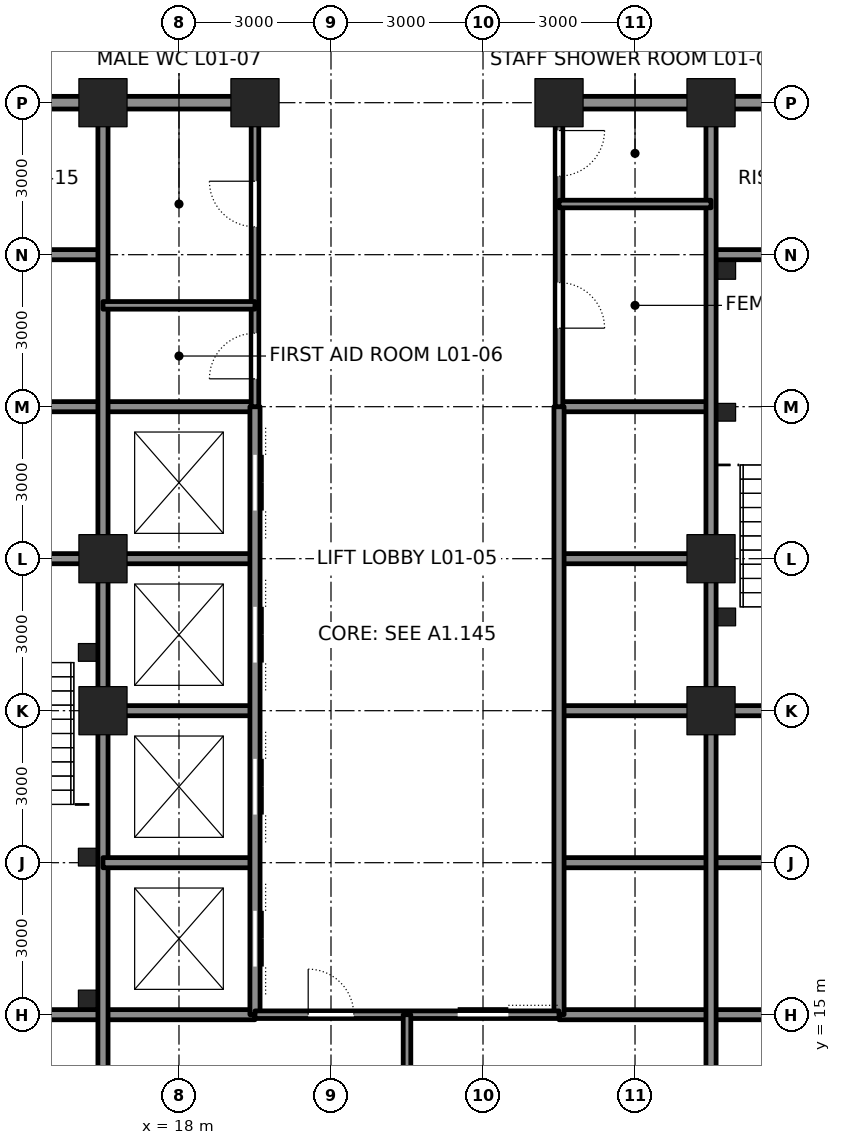
"""IFC4 building model, lengths in metres.
Left out: names, types, materials, properties, quantities, classifications, styles, units other than length and angle.
Written with IfcOpenShell. Run it as: python <this file> out.ifc"""

import sys

from ifc_helpers import new_model, si_unit, direction, frame, frame_2d, origin, origin_2d, place, context, subcontext, project, spatial, rectangle, hollow_rectangle, extrude, element, fill, save


model = new_model("IFC4")
c1 = context("Model", 3, precision=1e-05, world=origin(), true_north=direction((0.0, 1.0)))
c2 = subcontext(c1, "Body", "Model", "MODEL_VIEW")
j1 = project(units=[si_unit("LENGTHUNIT", "METRE"), si_unit("PLANEANGLEUNIT", "RADIAN")], contexts=[c1])
p1 = place(None, origin())
s1 = spatial("IfcSite", under=j1, at=p1, CompositionType="ELEMENT")
p2 = place(p1, origin())
s2 = spatial("IfcBuilding", under=s1, at=p2, CompositionType="ELEMENT")
p3 = place(p2, frame((0.0, 0.0, 6.0)))
s3 = spatial("IfcBuildingStorey", under=s2, at=p3, CompositionType="ELEMENT", Elevation=6.0)
for number, where, z_axis, x_axis in (
    (1, (16.5, 33.0, 0.0), (0.0, 0.0, 1.0), (1.0, 0.0, 0.0)),
    (2, (19.5, 33.0, 0.0), (0.0, 0.0, 1.0), (1.0, 0.0, 0.0)),
    (3, (25.5, 33.0, 0.0), (0.0, 0.0, 1.0), (1.0, 0.0, 0.0)),
    (4, (28.5, 33.0, 0.0), (0.0, 0.0, 1.0), (1.0, 0.0, 0.0)),
    (5, (16.5, 21.0, 0.0), (0.0, 0.0, 1.0), (1.0, 0.0, 0.0)),
    (6, (16.5, 24.0, 0.0), (0.0, 0.0, 1.0), (1.0, 0.0, 0.0)),
    (7, (28.5, 21.0, 0.0), (0.0, 0.0, 1.0), (1.0, 0.0, 0.0)),
    (8, (28.5, 24.0, 0.0), (0.0, 0.0, 1.0), (1.0, 0.0, 0.0)),
):
    element("IfcColumn", number, at=place(p3, frame(where, z_axis=z_axis, x_axis=x_axis)), inside=s3, PredefinedType="COLUMN", context=c2, shape_type="SweptSolid", body=[
        extrude(hollow_rectangle(XDim=0.95, YDim=0.95, WallThickness=0.095, at=origin_2d()), origin(), (0.0, 0.0, 1.0), 7.5),
    ])
for number, where, z_axis, x_axis in (
    (9, (12.0, 15.0, 0.0), (0.0, 0.0, 1.0), (1.0, 0.0, 0.0)),
    (10, (25.5, 15.0, 0.0), (0.0, 0.0, 1.0), (1.0, 0.0, 0.0)),
):
    element("IfcWall", number, at=place(p3, frame(where, z_axis=z_axis, x_axis=x_axis)), inside=s3, PredefinedType="SOLIDWALL", context=c2, shape_type="SweptSolid", body=[
        extrude(rectangle(XDim=7.5, YDim=0.2, at=frame_2d((3.75, 0.0))), origin(), (0.0, 0.0, 1.0), 7.3),
    ])
p4 = place(p3, frame((12.25, 24.0, 0.0), z_axis=(0.0, 0.0, 1.0), x_axis=(1.0, 0.0, 0.0)))
e11 = element("IfcWall", 11, at=p4, inside=s3, PredefinedType="SOLIDWALL", context=c2, shape_type="SweptSolid", body=[
    extrude(rectangle(XDim=4.0, YDim=0.2, at=frame_2d((2.0, 0.0))), origin(), (0.0, 0.0, 1.0), 6.35),
])
p5 = place(p4, frame((1.4, 0.0, 0.0)))
e12 = element("IfcOpeningElement", 12, at=p5, cuts=e11, PredefinedType="OPENING", context=c2, shape_type="SweptSolid", body=[
    extrude(rectangle(XDim=1.2, YDim=2.1, at=frame_2d((0.6, 1.05))), frame((0.0, 0.11, 0.0), z_axis=(0.0, -1.0, 0.0), x_axis=(1.0, 0.0, 0.0)), (0.0, 0.0, 1.0), 0.22),
])
for number, where, z_axis, x_axis in (
    (13, (16.75, 24.0, 0.0), (0.0, 0.0, 1.0), (1.0, 0.0, 0.0)),
    (14, (25.5, 24.0, 0.0), (0.0, 0.0, 1.0), (1.0, 0.0, 0.0)),
):
    element("IfcWall", number, at=place(p3, frame(where, z_axis=z_axis, x_axis=x_axis)), inside=s3, PredefinedType="SOLIDWALL", context=c2, shape_type="SweptSolid", body=[
        extrude(rectangle(XDim=2.75, YDim=0.2, at=frame_2d((1.375, 0.0))), origin(), (0.0, 0.0, 1.0), 6.35),
    ])
p6 = place(p3, frame((12.0, 27.0, 0.0), z_axis=(0.0, 0.0, 1.0), x_axis=(1.0, 0.0, 0.0)))
e15 = element("IfcWall", 15, at=p6, inside=s3, PredefinedType="SOLIDWALL", context=c2, shape_type="SweptSolid", body=[
    extrude(rectangle(XDim=7.5, YDim=0.2, at=frame_2d((3.75, 0.0))), origin(), (0.0, 0.0, 1.0), 7.3),
])
p7 = place(p6, frame((1.65, 0.0, 0.0)))
e16 = element("IfcOpeningElement", 16, at=p7, cuts=e15, PredefinedType="OPENING", context=c2, shape_type="SweptSolid", body=[
    extrude(rectangle(XDim=1.2, YDim=2.1, at=frame_2d((0.6, 1.05))), frame((0.0, 0.11, 0.0), z_axis=(0.0, -1.0, 0.0), x_axis=(1.0, 0.0, 0.0)), (0.0, 0.0, 1.0), 0.22),
])
p8 = place(p3, frame((25.5, 27.0, 0.0), z_axis=(0.0, 0.0, 1.0), x_axis=(1.0, 0.0, 0.0)))
e17 = element("IfcWall", 17, at=p8, inside=s3, PredefinedType="SOLIDWALL", context=c2, shape_type="SweptSolid", body=[
    extrude(rectangle(XDim=3.0, YDim=0.2, at=frame_2d((1.5, 0.0))), origin(), (0.0, 0.0, 1.0), 7.3),
])
for number, where, z_axis, x_axis in (
    (18, (12.0, 30.0, 0.0), (0.0, 0.0, 1.0), (1.0, 0.0, 0.0)),
    (19, (28.5, 30.0, 0.0), (0.0, 0.0, 1.0), (1.0, 0.0, 0.0)),
):
    element("IfcWall", number, at=place(p3, frame(where, z_axis=z_axis, x_axis=x_axis)), inside=s3, PredefinedType="SOLIDWALL", context=c2, shape_type="SweptSolid", body=[
        extrude(rectangle(XDim=4.5, YDim=0.2, at=frame_2d((2.25, 0.0))), origin(), (0.0, 0.0, 1.0), 7.3),
    ])
p9 = place(p3, frame((12.25, 33.0, 0.0), z_axis=(0.0, 0.0, 1.0), x_axis=(1.0, 0.0, 0.0)))
e20 = element("IfcWall", 20, at=p9, inside=s3, PredefinedType="SOLIDWALL", context=c2, shape_type="SweptSolid", body=[
    extrude(rectangle(XDim=4.0, YDim=0.25, at=frame_2d((2.0, 0.0))), origin(), (0.0, 0.0, 1.0), 6.441),
])
for number, where, z_axis, x_axis in (
    (21, (16.75, 33.0, 0.0), (0.0, 0.0, 1.0), (1.0, 0.0, 0.0)),
    (22, (25.75, 33.0, 0.0), (0.0, 0.0, 1.0), (1.0, 0.0, 0.0)),
):
    element("IfcWall", number, at=place(p3, frame(where, z_axis=z_axis, x_axis=x_axis)), inside=s3, PredefinedType="SOLIDWALL", context=c2, shape_type="SweptSolid", body=[
        extrude(rectangle(XDim=2.5, YDim=0.25, at=frame_2d((1.25, 0.0))), origin(), (0.0, 0.0, 1.0), 6.441),
    ])
p10 = place(p3, frame((28.75, 33.0, 0.0), z_axis=(0.0, 0.0, 1.0), x_axis=(1.0, 0.0, 0.0)))
e23 = element("IfcWall", 23, at=p10, inside=s3, PredefinedType="SOLIDWALL", context=c2, shape_type="SweptSolid", body=[
    extrude(rectangle(XDim=4.0, YDim=0.25, at=frame_2d((2.0, 0.0))), origin(), (0.0, 0.0, 1.0), 6.441),
])
p11 = place(p3, frame((16.5, 12.25, 0.0), z_axis=(0.0, 0.0, 1.0), x_axis=(0.0, 1.0, 0.0)))
e24 = element("IfcWall", 24, at=p11, inside=s3, PredefinedType="SOLIDWALL", context=c2, shape_type="SweptSolid", body=[
    extrude(rectangle(XDim=8.5, YDim=0.2, at=frame_2d((4.25, 0.0))), origin(), (0.0, 0.0, 1.0), 6.373),
])
p12 = place(p3, frame((16.5, 21.25, 0.0), z_axis=(0.0, 0.0, 1.0), x_axis=(0.0, 1.0, 0.0)))
e25 = element("IfcWall", 25, at=p12, inside=s3, PredefinedType="SOLIDWALL", context=c2, shape_type="SweptSolid", body=[
    extrude(rectangle(XDim=2.5, YDim=0.2, at=frame_2d((1.25, 0.0))), origin(), (0.0, 0.0, 1.0), 6.373),
])
p13 = place(p3, frame((16.5, 24.25, 0.0), z_axis=(0.0, 0.0, 1.0), x_axis=(0.0, 1.0, 0.0)))
e26 = element("IfcWall", 26, at=p13, inside=s3, PredefinedType="SOLIDWALL", context=c2, shape_type="SweptSolid", body=[
    extrude(rectangle(XDim=8.5, YDim=0.2, at=frame_2d((4.25, 0.0))), origin(), (0.0, 0.0, 1.0), 6.373),
])
p14 = place(p3, frame((16.5, 18.0, 0.0), z_axis=(0.0, 0.0, 1.0), x_axis=(1.0, 0.0, 0.0)))
e27 = element("IfcWall", 27, at=p14, inside=s3, PredefinedType="SOLIDWALL", context=c2, shape_type="SweptSolid", body=[
    extrude(rectangle(XDim=3.0, YDim=0.2, at=frame_2d((1.5, 0.0))), origin(), (0.0, 0.0, 1.0), 7.3),
])
p15 = place(p3, frame((25.5, 18.0, 0.0), z_axis=(0.0, 0.0, 1.0), x_axis=(1.0, 0.0, 0.0)))
e28 = element("IfcWall", 28, at=p15, inside=s3, PredefinedType="SOLIDWALL", context=c2, shape_type="SweptSolid", body=[
    extrude(rectangle(XDim=7.5, YDim=0.2, at=frame_2d((3.75, 0.0))), origin(), (0.0, 0.0, 1.0), 7.3),
])
p16 = place(p15, frame((4.65, 0.0, 0.0)))
e29 = element("IfcOpeningElement", 29, at=p16, cuts=e28, PredefinedType="OPENING", context=c2, shape_type="SweptSolid", body=[
    extrude(rectangle(XDim=1.2, YDim=2.1, at=frame_2d((0.6, 1.05))), frame((0.0, 0.11, 0.0), z_axis=(0.0, -1.0, 0.0), x_axis=(1.0, 0.0, 0.0)), (0.0, 0.0, 1.0), 0.22),
])
for number, where, z_axis, x_axis in (
    (30, (16.75, 21.0, 0.0), (0.0, 0.0, 1.0), (1.0, 0.0, 0.0)),
    (31, (25.5, 21.0, 0.0), (0.0, 0.0, 1.0), (1.0, 0.0, 0.0)),
):
    element("IfcWall", number, at=place(p3, frame(where, z_axis=z_axis, x_axis=x_axis)), inside=s3, PredefinedType="SOLIDWALL", context=c2, shape_type="SweptSolid", body=[
        extrude(rectangle(XDim=2.75, YDim=0.2, at=frame_2d((1.375, 0.0))), origin(), (0.0, 0.0, 1.0), 6.35),
    ])
p17 = place(p3, frame((28.75, 21.0, 0.0), z_axis=(0.0, 0.0, 1.0), x_axis=(1.0, 0.0, 0.0)))
e32 = element("IfcWall", 32, at=p17, inside=s3, PredefinedType="SOLIDWALL", context=c2, shape_type="SweptSolid", body=[
    extrude(rectangle(XDim=4.0, YDim=0.2, at=frame_2d((2.0, 0.0))), origin(), (0.0, 0.0, 1.0), 6.35),
])
p18 = place(p17, frame((1.4, 0.0, 0.0)))
e33 = element("IfcOpeningElement", 33, at=p18, cuts=e32, PredefinedType="OPENING", context=c2, shape_type="SweptSolid", body=[
    extrude(rectangle(XDim=1.2, YDim=2.1, at=frame_2d((0.6, 1.05))), frame((0.0, 0.11, 0.0), z_axis=(0.0, -1.0, 0.0), x_axis=(1.0, 0.0, 0.0)), (0.0, 0.0, 1.0), 0.22),
])
p19 = place(p3, frame((19.5, 15.0, 0.0), z_axis=(0.0, 0.0, 1.0), x_axis=(0.0, 1.0, 0.0)))
e34 = element("IfcWall", 34, at=p19, inside=s3, PredefinedType="SOLIDWALL", context=c2, shape_type="SweptSolid", body=[
    extrude(rectangle(XDim=12.0, YDim=0.2, at=frame_2d((6.0, 0.0))), origin(), (0.0, 0.0, 1.0), 6.325),
])
p20 = place(p19, frame((0.95, 0.0, 0.0)))
e35 = element("IfcOpeningElement", 35, at=p20, cuts=e34, PredefinedType="OPENING", context=c2, shape_type="SweptSolid", body=[
    extrude(rectangle(XDim=1.1, YDim=2.1, at=frame_2d((0.55, 1.05))), frame((0.0, 0.11, 0.0), z_axis=(0.0, -1.0, 0.0), x_axis=(1.0, 0.0, 0.0)), (0.0, 0.0, 1.0), 0.22),
])
p21 = place(p19, frame((3.95, 0.0, 0.0)))
e36 = element("IfcOpeningElement", 36, at=p21, cuts=e34, PredefinedType="OPENING", context=c2, shape_type="SweptSolid", body=[
    extrude(rectangle(XDim=1.1, YDim=2.1, at=frame_2d((0.55, 1.05))), frame((0.0, 0.11, 0.0), z_axis=(0.0, -1.0, 0.0), x_axis=(1.0, 0.0, 0.0)), (0.0, 0.0, 1.0), 0.22),
])
p22 = place(p19, frame((6.95, 0.0, 0.0)))
e37 = element("IfcOpeningElement", 37, at=p22, cuts=e34, PredefinedType="OPENING", context=c2, shape_type="SweptSolid", body=[
    extrude(rectangle(XDim=1.1, YDim=2.1, at=frame_2d((0.55, 1.05))), frame((0.0, 0.11, 0.0), z_axis=(0.0, -1.0, 0.0), x_axis=(1.0, 0.0, 0.0)), (0.0, 0.0, 1.0), 0.22),
])
p23 = place(p19, frame((9.95, 0.0, 0.0)))
e38 = element("IfcOpeningElement", 38, at=p23, cuts=e34, PredefinedType="OPENING", context=c2, shape_type="SweptSolid", body=[
    extrude(rectangle(XDim=1.1, YDim=2.1, at=frame_2d((0.55, 1.05))), frame((0.0, 0.11, 0.0), z_axis=(0.0, -1.0, 0.0), x_axis=(1.0, 0.0, 0.0)), (0.0, 0.0, 1.0), 0.22),
])
p24 = place(p3, frame((19.5, 27.0, 0.0), z_axis=(0.0, 0.0, 1.0), x_axis=(0.0, 1.0, 0.0)))
e39 = element("IfcWall", 39, at=p24, inside=s3, PredefinedType="PARTITIONING", context=c2, shape_type="SweptSolid", body=[
    extrude(rectangle(XDim=5.75, YDim=0.15, at=frame_2d((2.875, 0.0))), origin(), (0.0, 0.0, 1.0), 6.325),
])
p25 = place(p24, frame((0.55, 0.0, 0.0)))
e40 = element("IfcOpeningElement", 40, at=p25, cuts=e39, PredefinedType="OPENING", context=c2, shape_type="SweptSolid", body=[
    extrude(rectangle(XDim=0.9, YDim=2.1, at=frame_2d((0.45, 1.05))), frame((0.0, 0.085, 0.0), z_axis=(0.0, -1.0, 0.0), x_axis=(1.0, 0.0, 0.0)), (0.0, 0.0, 1.0), 0.17),
])
p26 = place(p24, frame((3.55, 0.0, 0.0)))
e41 = element("IfcOpeningElement", 41, at=p26, cuts=e39, PredefinedType="OPENING", context=c2, shape_type="SweptSolid", body=[
    extrude(rectangle(XDim=0.9, YDim=2.1, at=frame_2d((0.45, 1.05))), frame((0.0, 0.085, 0.0), z_axis=(0.0, -1.0, 0.0), x_axis=(1.0, 0.0, 0.0)), (0.0, 0.0, 1.0), 0.17),
])
p27 = place(p3, frame((25.5, 15.0, 0.0), z_axis=(0.0, 0.0, 1.0), x_axis=(0.0, 1.0, 0.0)))
e42 = element("IfcWall", 42, at=p27, inside=s3, PredefinedType="SOLIDWALL", context=c2, shape_type="SweptSolid", body=[
    extrude(rectangle(XDim=12.0, YDim=0.2, at=frame_2d((6.0, 0.0))), origin(), (0.0, 0.0, 1.0), 6.325),
])
p28 = place(p3, frame((25.5, 27.0, 0.0), z_axis=(0.0, 0.0, 1.0), x_axis=(0.0, 1.0, 0.0)))
e43 = element("IfcWall", 43, at=p28, inside=s3, PredefinedType="PARTITIONING", context=c2, shape_type="SweptSolid", body=[
    extrude(rectangle(XDim=5.75, YDim=0.15, at=frame_2d((2.875, 0.0))), origin(), (0.0, 0.0, 1.0), 6.325),
])
p29 = place(p28, frame((1.55, 0.0, 0.0)))
e44 = element("IfcOpeningElement", 44, at=p29, cuts=e43, PredefinedType="OPENING", context=c2, shape_type="SweptSolid", body=[
    extrude(rectangle(XDim=0.9, YDim=2.1, at=frame_2d((0.45, 1.05))), frame((0.0, 0.085, 0.0), z_axis=(0.0, -1.0, 0.0), x_axis=(1.0, 0.0, 0.0)), (0.0, 0.0, 1.0), 0.17),
])
p30 = place(p28, frame((4.55, 0.0, 0.0)))
e45 = element("IfcOpeningElement", 45, at=p30, cuts=e43, PredefinedType="OPENING", context=c2, shape_type="SweptSolid", body=[
    extrude(rectangle(XDim=0.9, YDim=2.1, at=frame_2d((0.45, 1.05))), frame((0.0, 0.085, 0.0), z_axis=(0.0, -1.0, 0.0), x_axis=(1.0, 0.0, 0.0)), (0.0, 0.0, 1.0), 0.17),
])
p31 = place(p3, frame((28.5, 12.25, 0.0), z_axis=(0.0, 0.0, 1.0), x_axis=(0.0, 1.0, 0.0)))
e46 = element("IfcWall", 46, at=p31, inside=s3, PredefinedType="SOLIDWALL", context=c2, shape_type="SweptSolid", body=[
    extrude(rectangle(XDim=8.5, YDim=0.2, at=frame_2d((4.25, 0.0))), origin(), (0.0, 0.0, 1.0), 6.373),
])
p32 = place(p3, frame((28.5, 21.25, 0.0), z_axis=(0.0, 0.0, 1.0), x_axis=(0.0, 1.0, 0.0)))
e47 = element("IfcWall", 47, at=p32, inside=s3, PredefinedType="SOLIDWALL", context=c2, shape_type="SweptSolid", body=[
    extrude(rectangle(XDim=2.5, YDim=0.2, at=frame_2d((1.25, 0.0))), origin(), (0.0, 0.0, 1.0), 6.373),
])
p33 = place(p3, frame((28.5, 24.25, 0.0), z_axis=(0.0, 0.0, 1.0), x_axis=(0.0, 1.0, 0.0)))
e48 = element("IfcWall", 48, at=p33, inside=s3, PredefinedType="SOLIDWALL", context=c2, shape_type="SweptSolid", body=[
    extrude(rectangle(XDim=8.5, YDim=0.2, at=frame_2d((4.25, 0.0))), origin(), (0.0, 0.0, 1.0), 6.373),
])
p34 = place(p3, frame((19.5, 15.0, 0.0), z_axis=(0.0, 0.0, 1.0), x_axis=(1.0, 0.0, 0.0)))
e49 = element("IfcWall", 49, at=p34, inside=s3, PredefinedType="PARTITIONING", context=c2, shape_type="SweptSolid", body=[
    extrude(rectangle(XDim=6.0, YDim=0.15, at=frame_2d((3.0, 0.0))), origin(), (0.0, 0.0, 1.0), 7.3),
])
p35 = place(p34, frame((4.0, 0.0, 0.0)))
e50 = element("IfcOpeningElement", 50, at=p35, cuts=e49, PredefinedType="OPENING", context=c2, shape_type="SweptSolid", body=[
    extrude(rectangle(XDim=1.0, YDim=2.1, at=frame_2d((0.5, 1.05))), frame((0.0, 0.085, 0.0), z_axis=(0.0, -1.0, 0.0), x_axis=(1.0, 0.0, 0.0)), (0.0, 0.0, 1.0), 0.17),
])
p36 = place(p34, frame((1.05, 0.0, 0.0)))
e51 = element("IfcOpeningElement", 51, at=p36, cuts=e49, PredefinedType="OPENING", context=c2, shape_type="SweptSolid", body=[
    extrude(rectangle(XDim=0.9, YDim=2.1, at=frame_2d((0.45, 1.05))), frame((0.0, 0.085, 0.0), z_axis=(0.0, -1.0, 0.0), x_axis=(1.0, 0.0, 0.0)), (0.0, 0.0, 1.0), 0.17),
])
for number, where, z_axis, x_axis in (
    (52, (22.5, 15.0, 0.0), (0.0, 0.0, 1.0), (0.0, -1.0, 0.0)),
    (53, (16.5, 29.0, 0.0), (0.0, 0.0, 1.0), (1.0, 0.0, 0.0)),
    (54, (25.5, 31.0, 0.0), (0.0, 0.0, 1.0), (1.0, 0.0, 0.0)),
):
    element("IfcWall", number, at=place(p3, frame(where, z_axis=z_axis, x_axis=x_axis)), inside=s3, PredefinedType="PARTITIONING", context=c2, shape_type="SweptSolid", body=[
        extrude(rectangle(XDim=3.0, YDim=0.15, at=frame_2d((1.5, 0.0))), origin(), (0.0, 0.0, 1.0), 7.3),
    ])
for number, where, z_axis, x_axis in (
    (55, (16.19, 15.31, 0.0), (0.0, 0.0, 1.0), (1.0, 0.0, 0.0)),
    (56, (16.19, 18.11, 0.0), (0.0, 0.0, 1.0), (1.0, 0.0, 0.0)),
    (57, (16.19, 22.15, 0.0), (0.0, 0.0, 1.0), (1.0, 0.0, 0.0)),
    (58, (28.81, 29.69, 0.0), (0.0, 0.0, 1.0), (1.0, 0.0, 0.0)),
    (59, (28.81, 26.89, 0.0), (0.0, 0.0, 1.0), (1.0, 0.0, 0.0)),
    (60, (28.81, 22.85, 0.0), (0.0, 0.0, 1.0), (1.0, 0.0, 0.0)),
):
    element("IfcColumn", number, at=place(p3, frame(where, z_axis=z_axis, x_axis=x_axis)), inside=s3, PredefinedType="COLUMN", context=c2, shape_type="SweptSolid", body=[
        extrude(hollow_rectangle(XDim=0.35, YDim=0.35, WallThickness=0.035, at=origin_2d()), origin(), (0.0, 0.0, 1.0), 7.5),
    ])
p37 = place(p25, origin())
e61 = element("IfcDoor", 61, at=p37, inside=s3, OperationType="SINGLE_SWING_LEFT", PredefinedType="DOOR", context=c2, shape_type="SweptSolid", body=[
    extrude(rectangle(XDim=0.9, YDim=2.1, at=frame_2d((0.45, 1.05))), frame((0.0, 0.025, 0.0), z_axis=(0.0, -1.0, 0.0), x_axis=(1.0, 0.0, 0.0)), (0.0, 0.0, 1.0), 0.05),
])
fill(e40, e61)
p38 = place(p26, origin())
e62 = element("IfcDoor", 62, at=p38, inside=s3, OperationType="SINGLE_SWING_RIGHT", PredefinedType="DOOR", context=c2, shape_type="SweptSolid", body=[
    extrude(rectangle(XDim=0.9, YDim=2.1, at=frame_2d((0.45, 1.05))), frame((0.0, 0.025, 0.0), z_axis=(0.0, -1.0, 0.0), x_axis=(1.0, 0.0, 0.0)), (0.0, 0.0, 1.0), 0.05),
])
fill(e41, e62)
p39 = place(p29, frame((0.9, 0.0, 0.0), z_axis=(0.0, 0.0, 1.0), x_axis=(-1.0, 0.0, 0.0)))
e63 = element("IfcDoor", 63, at=p39, inside=s3, OperationType="SINGLE_SWING_RIGHT", PredefinedType="DOOR", context=c2, shape_type="SweptSolid", body=[
    extrude(rectangle(XDim=0.9, YDim=2.1, at=frame_2d((0.45, 1.05))), frame((0.0, 0.025, 0.0), z_axis=(0.0, -1.0, 0.0), x_axis=(1.0, 0.0, 0.0)), (0.0, 0.0, 1.0), 0.05),
])
fill(e44, e63)
p40 = place(p30, frame((0.9, 0.0, 0.0), z_axis=(0.0, 0.0, 1.0), x_axis=(-1.0, 0.0, 0.0)))
e64 = element("IfcDoor", 64, at=p40, inside=s3, OperationType="SINGLE_SWING_LEFT", PredefinedType="DOOR", context=c2, shape_type="SweptSolid", body=[
    extrude(rectangle(XDim=0.9, YDim=2.1, at=frame_2d((0.45, 1.05))), frame((0.0, 0.025, 0.0), z_axis=(0.0, -1.0, 0.0), x_axis=(1.0, 0.0, 0.0)), (0.0, 0.0, 1.0), 0.05),
])
fill(e45, e64)
p41 = place(p35, origin())
e65 = element("IfcDoor", 65, at=p41, inside=s3, OperationType="SLIDING_TO_LEFT", PredefinedType="DOOR", context=c2, shape_type="SweptSolid", body=[
    extrude(rectangle(XDim=1.0, YDim=2.1, at=frame_2d((0.5, 1.05))), frame((0.0, 0.025, 0.0), z_axis=(0.0, -1.0, 0.0), x_axis=(1.0, 0.0, 0.0)), (0.0, 0.0, 1.0), 0.05),
])
fill(e50, e65)
p42 = place(p36, origin())
e66 = element("IfcDoor", 66, at=p42, inside=s3, OperationType="SINGLE_SWING_LEFT", PredefinedType="DOOR", context=c2, shape_type="SweptSolid", body=[
    extrude(rectangle(XDim=0.9, YDim=2.1, at=frame_2d((0.45, 1.05))), frame((0.0, 0.025, 0.0), z_axis=(0.0, -1.0, 0.0), x_axis=(1.0, 0.0, 0.0)), (0.0, 0.0, 1.0), 0.05),
])
fill(e51, e66)
p43 = place(p20, origin())
e67 = element("IfcDoor", 67, at=p43, inside=s3, OperationType="DOUBLE_DOOR_SLIDING", PredefinedType="DOOR", context=c2, shape_type="SweptSolid", body=[
    extrude(rectangle(XDim=1.1, YDim=2.1, at=frame_2d((0.55, 1.05))), frame((0.0, 0.025, 0.0), z_axis=(0.0, -1.0, 0.0), x_axis=(1.0, 0.0, 0.0)), (0.0, 0.0, 1.0), 0.05),
])
fill(e35, e67)
p44 = place(p21, origin())
e68 = element("IfcDoor", 68, at=p44, inside=s3, OperationType="DOUBLE_DOOR_SLIDING", PredefinedType="DOOR", context=c2, shape_type="SweptSolid", body=[
    extrude(rectangle(XDim=1.1, YDim=2.1, at=frame_2d((0.55, 1.05))), frame((0.0, 0.025, 0.0), z_axis=(0.0, -1.0, 0.0), x_axis=(1.0, 0.0, 0.0)), (0.0, 0.0, 1.0), 0.05),
])
fill(e36, e68)
p45 = place(p22, origin())
e69 = element("IfcDoor", 69, at=p45, inside=s3, OperationType="DOUBLE_DOOR_SLIDING", PredefinedType="DOOR", context=c2, shape_type="SweptSolid", body=[
    extrude(rectangle(XDim=1.1, YDim=2.1, at=frame_2d((0.55, 1.05))), frame((0.0, 0.025, 0.0), z_axis=(0.0, -1.0, 0.0), x_axis=(1.0, 0.0, 0.0)), (0.0, 0.0, 1.0), 0.05),
])
fill(e37, e69)
p46 = place(p23, origin())
e70 = element("IfcDoor", 70, at=p46, inside=s3, OperationType="DOUBLE_DOOR_SLIDING", PredefinedType="DOOR", context=c2, shape_type="SweptSolid", body=[
    extrude(rectangle(XDim=1.1, YDim=2.1, at=frame_2d((0.55, 1.05))), frame((0.0, 0.025, 0.0), z_axis=(0.0, -1.0, 0.0), x_axis=(1.0, 0.0, 0.0)), (0.0, 0.0, 1.0), 0.05),
])
fill(e38, e70)
save(model, sys.argv[1])
